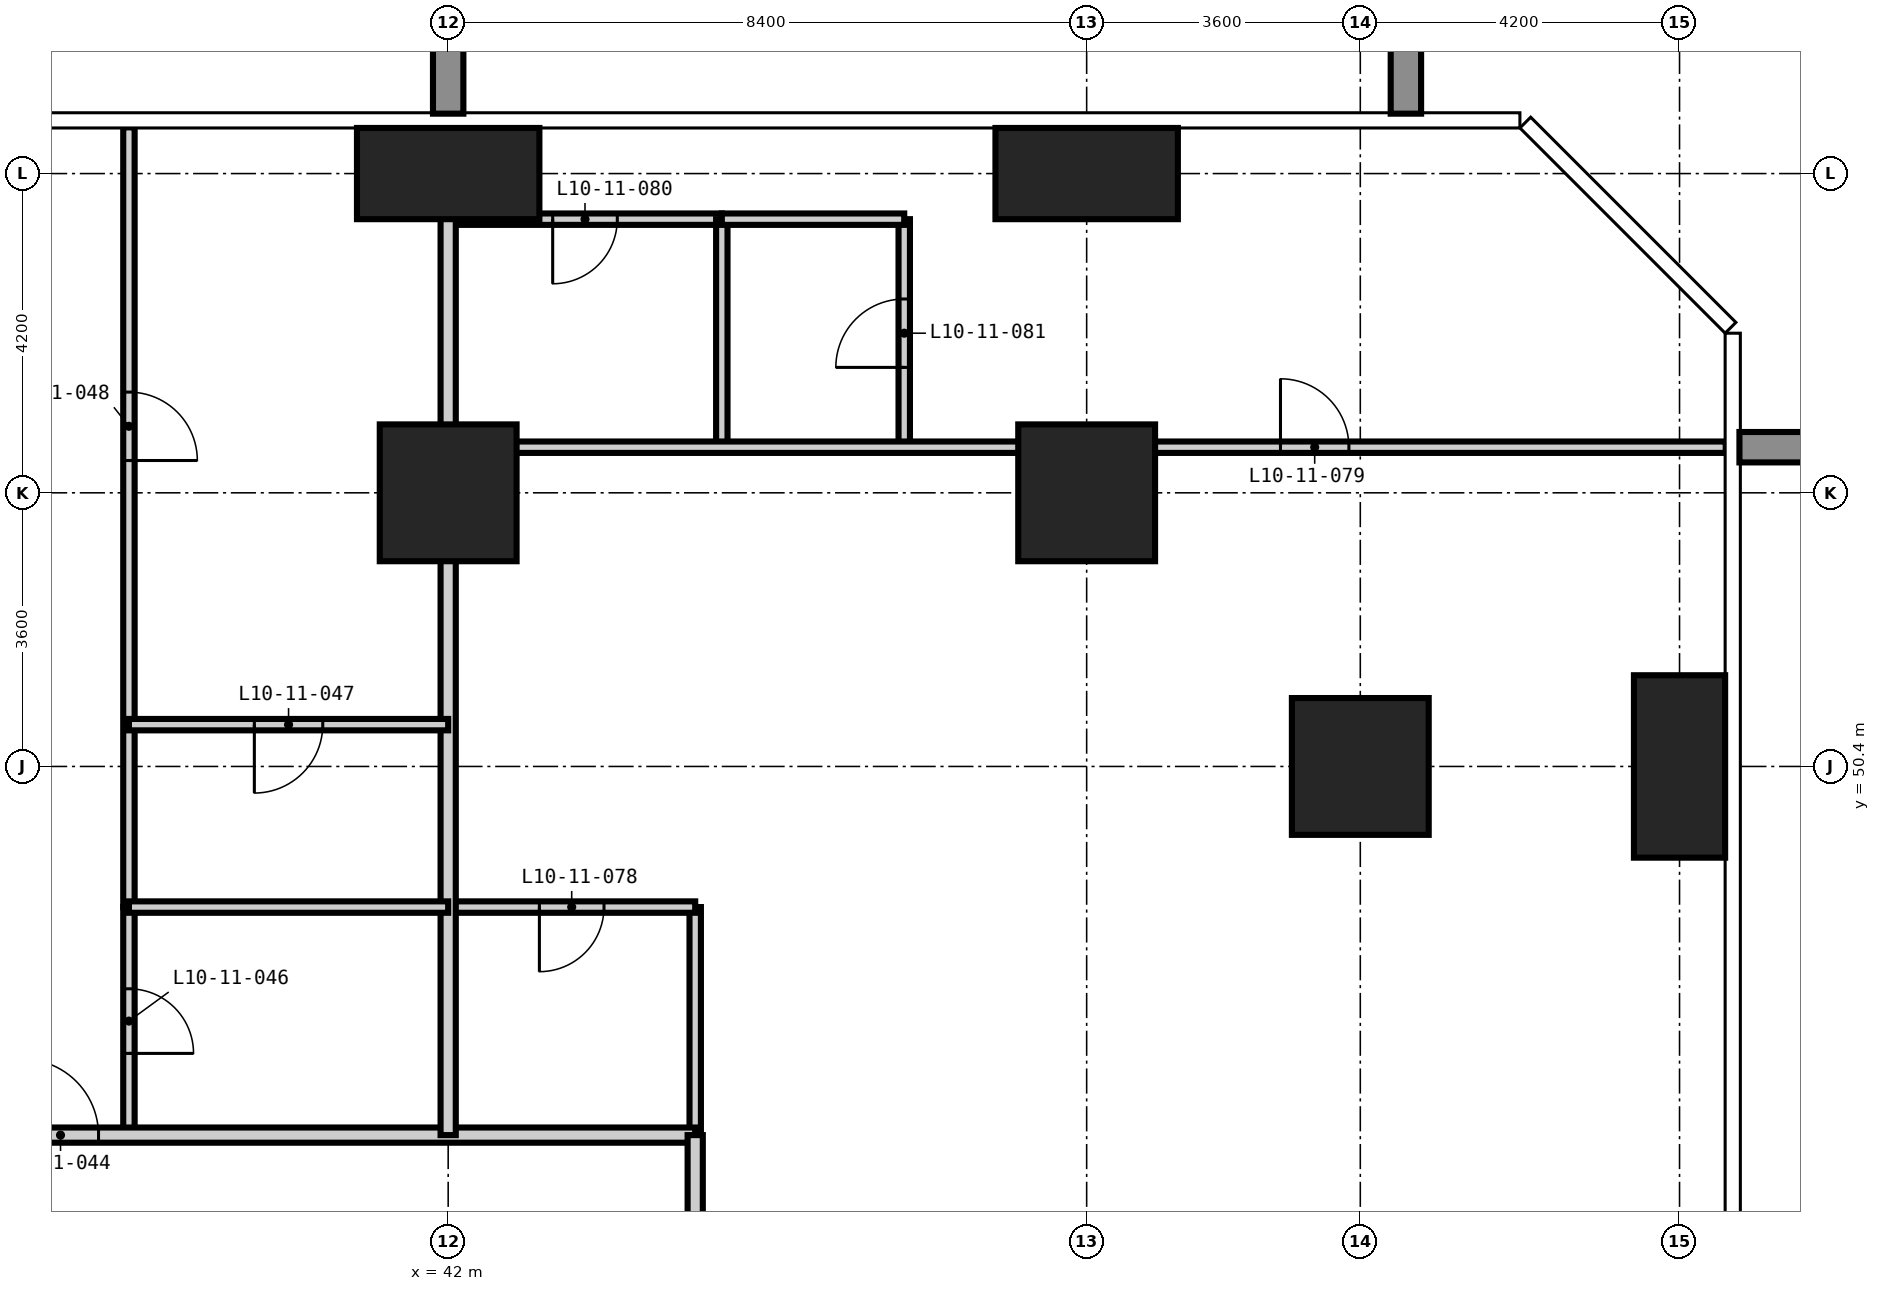
"""IFC4 building model, lengths in metres.
Left out: names, types, materials, properties, quantities, classifications, styles, units other than length and angle.
Written with IfcOpenShell. Run it as: python <this file> out.ifc"""

import sys

from ifc_helpers import new_model, si_unit, direction, frame, frame_2d, origin, origin_2d, place, context, subcontext, project, spatial, rectangle, extrude, element, fill, save


model = new_model("IFC4")
c1 = context("Model", 3, precision=1e-05, world=origin(), true_north=direction((0.0, 1.0)))
c2 = subcontext(c1, "Body", "Model", "MODEL_VIEW")
j1 = project(units=[si_unit("LENGTHUNIT", "METRE"), si_unit("PLANEANGLEUNIT", "RADIAN")], contexts=[c1])
p1 = place(None, origin())
s1 = spatial("IfcSite", under=j1, at=p1, CompositionType="ELEMENT")
p2 = place(p1, origin())
s2 = spatial("IfcBuilding", under=s1, at=p2, CompositionType="ELEMENT")
p3 = place(p2, frame((0.0, 0.0, 45.0)))
s3 = spatial("IfcBuildingStorey", under=s2, at=p3, CompositionType="ELEMENT", Elevation=45.0)
p4 = place(p3, frame((42.0, 54.0, -0.35), z_axis=(0.0, 0.0, 1.0), x_axis=(1.0, 0.0, 0.0)))
e1 = element("IfcColumn", 1, at=p4, inside=s3, PredefinedType="COLUMN", context=c2, shape_type="SweptSolid", body=[
    extrude(rectangle(XDim=1.8, YDim=1.8, at=origin_2d()), origin(), (0.0, 0.0, 1.0), 3.6),
])
p5 = place(p3, frame((42.0, 58.2, -0.35), z_axis=(0.0, 0.0, 1.0), x_axis=(1.0, 0.0, 0.0)))
e2 = element("IfcColumn", 2, at=p5, inside=s3, PredefinedType="COLUMN", context=c2, shape_type="SweptSolid", body=[
    extrude(rectangle(XDim=2.4, YDim=1.2, at=origin_2d()), origin(), (0.0, 0.0, 1.0), 3.6),
])
p6 = place(p3, frame((50.4, 54.0, -0.35), z_axis=(0.0, 0.0, 1.0), x_axis=(1.0, 0.0, 0.0)))
e3 = element("IfcColumn", 3, at=p6, inside=s3, PredefinedType="COLUMN", context=c2, shape_type="SweptSolid", body=[
    extrude(rectangle(XDim=1.8, YDim=1.8, at=origin_2d()), origin(), (0.0, 0.0, 1.0), 3.6),
])
p7 = place(p3, frame((50.4, 58.2, -0.35), z_axis=(0.0, 0.0, 1.0), x_axis=(1.0, 0.0, 0.0)))
e4 = element("IfcColumn", 4, at=p7, inside=s3, PredefinedType="COLUMN", context=c2, shape_type="SweptSolid", body=[
    extrude(rectangle(XDim=2.4, YDim=1.2, at=origin_2d()), origin(), (0.0, 0.0, 1.0), 3.6),
])
p8 = place(p3, frame((54.0, 50.4, -0.35), z_axis=(0.0, 0.0, 1.0), x_axis=(1.0, 0.0, 0.0)))
e5 = element("IfcColumn", 5, at=p8, inside=s3, PredefinedType="COLUMN", context=c2, shape_type="SweptSolid", body=[
    extrude(rectangle(XDim=1.8, YDim=1.8, at=origin_2d()), origin(), (0.0, 0.0, 1.0), 3.6),
])
p9 = place(p3, frame((58.2, 50.4, -0.35), z_axis=(0.0, 0.0, 1.0), x_axis=(1.0, 0.0, 0.0)))
e6 = element("IfcColumn", 6, at=p9, inside=s3, PredefinedType="COLUMN", context=c2, shape_type="SweptSolid", body=[
    extrude(rectangle(XDim=1.2, YDim=2.4, at=origin_2d()), origin(), (0.0, 0.0, 1.0), 3.6),
])
p10 = place(p3, frame((37.8, 45.55, 0.0), z_axis=(0.0, 0.0, 1.0), x_axis=(0.0, 1.0, 0.0)))
e7 = element("IfcWall", 7, at=p10, inside=s3, PredefinedType="PARTITIONING", context=c2, shape_type="SweptSolid", body=[
    extrude(rectangle(XDim=3.0, YDim=0.15, at=frame_2d((1.5, 0.0))), origin(), (0.0, 0.0, 1.0), 3.25),
])
p11 = place(p10, frame((1.075, 0.0, 0.0)))
e8 = element("IfcOpeningElement", 8, at=p11, cuts=e7, PredefinedType="OPENING", context=c2, shape_type="SweptSolid", body=[
    extrude(rectangle(XDim=0.85, YDim=2.1, at=frame_2d((0.425, 1.05))), frame((0.0, 0.085, 0.0), z_axis=(0.0, -1.0, 0.0), x_axis=(1.0, 0.0, 0.0)), (0.0, 0.0, 1.0), 0.17),
])
p12 = place(p3, frame((45.25, 45.55, 0.0), z_axis=(0.0, 0.0, 1.0), x_axis=(0.0, 1.0, 0.0)))
e9 = element("IfcWall", 9, at=p12, inside=s3, PredefinedType="PARTITIONING", context=c2, shape_type="SweptSolid", body=[
    extrude(rectangle(XDim=3.0, YDim=0.15, at=frame_2d((1.5, 0.0))), origin(), (0.0, 0.0, 1.0), 3.25),
])
p13 = place(p3, frame((42.0, 48.55, 0.0), z_axis=(0.0, 0.0, 1.0), x_axis=(1.0, 0.0, 0.0)))
e10 = element("IfcWall", 10, at=p13, inside=s3, PredefinedType="PARTITIONING", context=c2, shape_type="SweptSolid", body=[
    extrude(rectangle(XDim=3.25, YDim=0.15, at=frame_2d((1.625, 0.0))), origin(), (0.0, 0.0, 1.0), 3.25),
])
p14 = place(p13, frame((1.2, 0.0, 0.0)))
e11 = element("IfcOpeningElement", 11, at=p14, cuts=e10, PredefinedType="OPENING", context=c2, shape_type="SweptSolid", body=[
    extrude(rectangle(XDim=0.85, YDim=2.1, at=frame_2d((0.425, 1.05))), frame((0.0, 0.085, 0.0), z_axis=(0.0, -1.0, 0.0), x_axis=(1.0, 0.0, 0.0)), (0.0, 0.0, 1.0), 0.17),
])
p15 = place(p3, frame((42.0, 57.6, 0.0), z_axis=(0.0, 0.0, 1.0), x_axis=(1.0, 0.0, 0.0)))
e12 = element("IfcWall", 12, at=p15, inside=s3, PredefinedType="PARTITIONING", context=c2, shape_type="SweptSolid", body=[
    extrude(rectangle(XDim=3.6, YDim=0.15, at=frame_2d((1.8, 0.0))), origin(), (0.0, 0.0, 1.0), 3.25),
])
p16 = place(p15, frame((1.375, 0.0, 0.0)))
e13 = element("IfcOpeningElement", 13, at=p16, cuts=e12, PredefinedType="OPENING", context=c2, shape_type="SweptSolid", body=[
    extrude(rectangle(XDim=0.85, YDim=2.1, at=frame_2d((0.425, 1.05))), frame((0.0, 0.085, 0.0), z_axis=(0.0, -1.0, 0.0), x_axis=(1.0, 0.0, 0.0)), (0.0, 0.0, 1.0), 0.17),
])
p17 = place(p3, frame((12.95, 45.55, 0.0), z_axis=(0.0, 0.0, 1.0), x_axis=(1.0, 0.0, 0.0)))
e14 = element("IfcWall", 14, at=p17, inside=s3, PredefinedType="PARTITIONING", context=c2, shape_type="SweptSolid", body=[
    extrude(rectangle(XDim=32.3, YDim=0.2, at=frame_2d((16.15, 0.0))), origin(), (0.0, 0.0, 1.0), 3.25),
])
p18 = place(p17, frame((6.65, 0.0, 0.0)))
e15 = element("IfcOpeningElement", 15, at=p18, cuts=e14, PredefinedType="OPENING", context=c2, shape_type="SweptSolid", body=[
    extrude(rectangle(XDim=1.0, YDim=2.2, at=frame_2d((0.5, 1.1))), frame((0.0, 0.11, 0.0), z_axis=(0.0, -1.0, 0.0), x_axis=(1.0, 0.0, 0.0)), (0.0, 0.0, 1.0), 0.22),
])
p19 = place(p17, frame((15.05, 0.0, 0.0)))
e16 = element("IfcOpeningElement", 16, at=p19, cuts=e14, PredefinedType="OPENING", context=c2, shape_type="SweptSolid", body=[
    extrude(rectangle(XDim=1.0, YDim=2.2, at=frame_2d((0.5, 1.1))), frame((0.0, 0.11, 0.0), z_axis=(0.0, -1.0, 0.0), x_axis=(1.0, 0.0, 0.0)), (0.0, 0.0, 1.0), 0.22),
])
p20 = place(p17, frame((23.45, 0.0, 0.0)))
e17 = element("IfcOpeningElement", 17, at=p20, cuts=e14, PredefinedType="OPENING", context=c2, shape_type="SweptSolid", body=[
    extrude(rectangle(XDim=1.0, YDim=2.2, at=frame_2d((0.5, 1.1))), frame((0.0, 0.11, 0.0), z_axis=(0.0, -1.0, 0.0), x_axis=(1.0, 0.0, 0.0)), (0.0, 0.0, 1.0), 0.22),
])
p21 = place(p3, frame((45.25, 45.55, 0.0), z_axis=(0.0, 0.0, 1.0), x_axis=(0.0, -1.0, 0.0)))
e18 = element("IfcWall", 18, at=p21, inside=s3, PredefinedType="PARTITIONING", context=c2, shape_type="SweptSolid", body=[
    extrude(rectangle(XDim=32.6, YDim=0.2, at=frame_2d((16.3, 0.0))), origin(), (0.0, 0.0, 1.0), 3.25),
])
p22 = place(p21, frame((24.8, 0.0, 0.0)))
e19 = element("IfcOpeningElement", 19, at=p22, cuts=e18, PredefinedType="OPENING", context=c2, shape_type="SweptSolid", body=[
    extrude(rectangle(XDim=1.0, YDim=2.2, at=frame_2d((0.5, 1.1))), frame((0.0, 0.11, 0.0), z_axis=(0.0, -1.0, 0.0), x_axis=(1.0, 0.0, 0.0)), (0.0, 0.0, 1.0), 0.22),
])
p23 = place(p21, frame((19.85, 0.0, 0.0)))
e20 = element("IfcOpeningElement", 20, at=p23, cuts=e18, PredefinedType="OPENING", context=c2, shape_type="SweptSolid", body=[
    extrude(rectangle(XDim=1.0, YDim=2.2, at=frame_2d((0.5, 1.1))), frame((0.0, 0.11, 0.0), z_axis=(0.0, -1.0, 0.0), x_axis=(1.0, 0.0, 0.0)), (0.0, 0.0, 1.0), 0.22),
])
p24 = place(p21, frame((11.45, 0.0, 0.0)))
e21 = element("IfcOpeningElement", 21, at=p24, cuts=e18, PredefinedType="OPENING", context=c2, shape_type="SweptSolid", body=[
    extrude(rectangle(XDim=1.0, YDim=2.2, at=frame_2d((0.5, 1.1))), frame((0.0, 0.11, 0.0), z_axis=(0.0, -1.0, 0.0), x_axis=(1.0, 0.0, 0.0)), (0.0, 0.0, 1.0), 0.22),
])
p25 = place(p21, frame((6.5, 0.0, 0.0)))
e22 = element("IfcOpeningElement", 22, at=p25, cuts=e18, PredefinedType="OPENING", context=c2, shape_type="SweptSolid", body=[
    extrude(rectangle(XDim=1.0, YDim=2.2, at=frame_2d((0.5, 1.1))), frame((0.0, 0.11, 0.0), z_axis=(0.0, -1.0, 0.0), x_axis=(1.0, 0.0, 0.0)), (0.0, 0.0, 1.0), 0.22),
])
p26 = place(p21, frame((30.175, 0.0, 0.0)))
e23 = element("IfcOpeningElement", 23, at=p26, cuts=e18, PredefinedType="OPENING", context=c2, shape_type="SweptSolid", body=[
    extrude(rectangle(XDim=1.0, YDim=2.2, at=frame_2d((0.5, 1.1))), frame((0.0, 0.11, 0.0), z_axis=(0.0, -1.0, 0.0), x_axis=(1.0, 0.0, 0.0)), (0.0, 0.0, 1.0), 0.22),
])
p27 = place(p21, frame((1.275, 0.0, 0.0)))
e24 = element("IfcOpeningElement", 24, at=p27, cuts=e18, PredefinedType="OPENING", context=c2, shape_type="SweptSolid", body=[
    extrude(rectangle(XDim=1.0, YDim=2.2, at=frame_2d((0.5, 1.1))), frame((0.0, 0.11, 0.0), z_axis=(0.0, -1.0, 0.0), x_axis=(1.0, 0.0, 0.0)), (0.0, 0.0, 1.0), 0.22),
])
p28 = place(p3, frame((42.0, 45.55, 0.0), z_axis=(0.0, 0.0, 1.0), x_axis=(0.0, 1.0, 0.0)))
e25 = element("IfcWall", 25, at=p28, inside=s3, PredefinedType="PARTITIONING", context=c2, shape_type="SweptSolid", body=[
    extrude(rectangle(XDim=13.258, YDim=0.2, at=frame_2d((6.629, 0.0))), origin(), (0.0, 0.0, 1.0), 3.25),
])
p29 = place(p3, frame((37.8, 48.55, 0.0), z_axis=(0.0, 0.0, 1.0), x_axis=(0.0, 1.0, 0.0)))
e26 = element("IfcWall", 26, at=p29, inside=s3, PredefinedType="PARTITIONING", context=c2, shape_type="SweptSolid", body=[
    extrude(rectangle(XDim=10.258, YDim=0.15, at=frame_2d((5.129, 0.0))), origin(), (0.0, 0.0, 1.0), 3.25),
])
p30 = place(p29, frame((5.875, 0.0, 0.0)))
e27 = element("IfcOpeningElement", 27, at=p30, cuts=e26, PredefinedType="OPENING", context=c2, shape_type="SweptSolid", body=[
    extrude(rectangle(XDim=0.9, YDim=2.1, at=frame_2d((0.45, 1.05))), frame((0.0, 0.085, 0.0), z_axis=(0.0, -1.0, 0.0), x_axis=(1.0, 0.0, 0.0)), (0.0, 0.0, 1.0), 0.17),
])
p31 = place(p3, frame((45.6, 54.6, 0.0), z_axis=(0.0, 0.0, 1.0), x_axis=(0.0, 1.0, 0.0)))
e28 = element("IfcWall", 28, at=p31, inside=s3, PredefinedType="PARTITIONING", context=c2, shape_type="SweptSolid", body=[
    extrude(rectangle(XDim=3.0, YDim=0.15, at=frame_2d((1.5, 0.0))), origin(), (0.0, 0.0, 1.0), 3.25),
])
p32 = place(p3, frame((48.0, 54.6, 0.0), z_axis=(0.0, 0.0, 1.0), x_axis=(0.0, 1.0, 0.0)))
e29 = element("IfcWall", 29, at=p32, inside=s3, PredefinedType="PARTITIONING", context=c2, shape_type="SweptSolid", body=[
    extrude(rectangle(XDim=3.0, YDim=0.15, at=frame_2d((1.5, 0.0))), origin(), (0.0, 0.0, 1.0), 3.25),
])
p33 = place(p32, frame((1.05, 0.0, 0.0)))
e30 = element("IfcOpeningElement", 30, at=p33, cuts=e29, PredefinedType="OPENING", context=c2, shape_type="SweptSolid", body=[
    extrude(rectangle(XDim=0.9, YDim=2.1, at=frame_2d((0.45, 1.05))), frame((0.0, 0.085, 0.0), z_axis=(0.0, -1.0, 0.0), x_axis=(1.0, 0.0, 0.0)), (0.0, 0.0, 1.0), 0.17),
])
p34 = place(p3, frame((37.8, 48.55, 0.0), z_axis=(0.0, 0.0, 1.0), x_axis=(1.0, 0.0, 0.0)))
e31 = element("IfcWall", 31, at=p34, inside=s3, PredefinedType="PARTITIONING", context=c2, shape_type="SweptSolid", body=[
    extrude(rectangle(XDim=4.2, YDim=0.15, at=frame_2d((2.1, 0.0))), origin(), (0.0, 0.0, 1.0), 3.25),
])
p35 = place(p3, frame((37.8, 50.95, 0.0), z_axis=(0.0, 0.0, 1.0), x_axis=(1.0, 0.0, 0.0)))
e32 = element("IfcWall", 32, at=p35, inside=s3, PredefinedType="PARTITIONING", context=c2, shape_type="SweptSolid", body=[
    extrude(rectangle(XDim=4.2, YDim=0.15, at=frame_2d((2.1, 0.0))), origin(), (0.0, 0.0, 1.0), 3.25),
])
p36 = place(p35, frame((1.65, 0.0, 0.0)))
e33 = element("IfcOpeningElement", 33, at=p36, cuts=e32, PredefinedType="OPENING", context=c2, shape_type="SweptSolid", body=[
    extrude(rectangle(XDim=0.9, YDim=2.1, at=frame_2d((0.45, 1.05))), frame((0.0, 0.085, 0.0), z_axis=(0.0, -1.0, 0.0), x_axis=(1.0, 0.0, 0.0)), (0.0, 0.0, 1.0), 0.17),
])
p37 = place(p3, frame((42.0, 54.6, 0.0), z_axis=(0.0, 0.0, 1.0), x_axis=(1.0, 0.0, 0.0)))
e34 = element("IfcWall", 34, at=p37, inside=s3, PredefinedType="PARTITIONING", context=c2, shape_type="SweptSolid", body=[
    extrude(rectangle(XDim=16.808, YDim=0.15, at=frame_2d((8.404, 0.0))), origin(), (0.0, 0.0, 1.0), 3.25),
])
p38 = place(p37, frame((10.95, 0.0, 0.0)))
e35 = element("IfcOpeningElement", 35, at=p38, cuts=e34, PredefinedType="OPENING", context=c2, shape_type="SweptSolid", body=[
    extrude(rectangle(XDim=0.9, YDim=2.1, at=frame_2d((0.45, 1.05))), frame((0.0, 0.085, 0.0), z_axis=(0.0, -1.0, 0.0), x_axis=(1.0, 0.0, 0.0)), (0.0, 0.0, 1.0), 0.17),
])
p39 = place(p3, frame((45.6, 57.6, 0.0), z_axis=(0.0, 0.0, 1.0), x_axis=(1.0, 0.0, 0.0)))
e36 = element("IfcWall", 36, at=p39, inside=s3, PredefinedType="PARTITIONING", context=c2, shape_type="SweptSolid", body=[
    extrude(rectangle(XDim=2.4, YDim=0.15, at=frame_2d((1.2, 0.0))), origin(), (0.0, 0.0, 1.0), 3.25),
])
p40 = place(p20, origin())
e37 = element("IfcDoor", 37, at=p40, inside=s3, OperationType="SINGLE_SWING_LEFT", PredefinedType="DOOR", context=c2, shape_type="SweptSolid", body=[
    extrude(rectangle(XDim=1.0, YDim=2.2, at=frame_2d((0.5, 1.1))), frame((0.0, 0.025, 0.0), z_axis=(0.0, -1.0, 0.0), x_axis=(1.0, 0.0, 0.0)), (0.0, 0.0, 1.0), 0.05),
])
fill(e17, e37)
p41 = place(p11, frame((0.85, 0.0, 0.0), z_axis=(0.0, 0.0, 1.0), x_axis=(-1.0, 0.0, 0.0)))
e38 = element("IfcDoor", 38, at=p41, inside=s3, OperationType="SINGLE_SWING_RIGHT", PredefinedType="DOOR", context=c2, shape_type="SweptSolid", body=[
    extrude(rectangle(XDim=0.85, YDim=2.1, at=frame_2d((0.425, 1.05))), frame((0.0, 0.025, 0.0), z_axis=(0.0, -1.0, 0.0), x_axis=(1.0, 0.0, 0.0)), (0.0, 0.0, 1.0), 0.05),
])
fill(e8, e38)
p42 = place(p36, frame((0.9, 0.0, 0.0), z_axis=(0.0, 0.0, 1.0), x_axis=(-1.0, 0.0, 0.0)))
e39 = element("IfcDoor", 39, at=p42, inside=s3, OperationType="SINGLE_SWING_RIGHT", PredefinedType="DOOR", context=c2, shape_type="SweptSolid", body=[
    extrude(rectangle(XDim=0.9, YDim=2.1, at=frame_2d((0.45, 1.05))), frame((0.0, 0.025, 0.0), z_axis=(0.0, -1.0, 0.0), x_axis=(1.0, 0.0, 0.0)), (0.0, 0.0, 1.0), 0.05),
])
fill(e33, e39)
p43 = place(p30, frame((0.9, 0.0, 0.0), z_axis=(0.0, 0.0, 1.0), x_axis=(-1.0, 0.0, 0.0)))
e40 = element("IfcDoor", 40, at=p43, inside=s3, OperationType="SINGLE_SWING_RIGHT", PredefinedType="DOOR", context=c2, shape_type="SweptSolid", body=[
    extrude(rectangle(XDim=0.9, YDim=2.1, at=frame_2d((0.45, 1.05))), frame((0.0, 0.025, 0.0), z_axis=(0.0, -1.0, 0.0), x_axis=(1.0, 0.0, 0.0)), (0.0, 0.0, 1.0), 0.05),
])
fill(e27, e40)
p44 = place(p14, frame((0.85, 0.0, 0.0), z_axis=(0.0, 0.0, 1.0), x_axis=(-1.0, 0.0, 0.0)))
e41 = element("IfcDoor", 41, at=p44, inside=s3, OperationType="SINGLE_SWING_RIGHT", PredefinedType="DOOR", context=c2, shape_type="SweptSolid", body=[
    extrude(rectangle(XDim=0.85, YDim=2.1, at=frame_2d((0.425, 1.05))), frame((0.0, 0.025, 0.0), z_axis=(0.0, -1.0, 0.0), x_axis=(1.0, 0.0, 0.0)), (0.0, 0.0, 1.0), 0.05),
])
fill(e11, e41)
p45 = place(p38, origin())
e42 = element("IfcDoor", 42, at=p45, inside=s3, OperationType="SINGLE_SWING_LEFT", PredefinedType="DOOR", context=c2, shape_type="SweptSolid", body=[
    extrude(rectangle(XDim=0.9, YDim=2.1, at=frame_2d((0.45, 1.05))), frame((0.0, 0.025, 0.0), z_axis=(0.0, -1.0, 0.0), x_axis=(1.0, 0.0, 0.0)), (0.0, 0.0, 1.0), 0.05),
])
fill(e35, e42)
p46 = place(p16, frame((0.85, 0.0, 0.0), z_axis=(0.0, 0.0, 1.0), x_axis=(-1.0, 0.0, 0.0)))
e43 = element("IfcDoor", 43, at=p46, inside=s3, OperationType="SINGLE_SWING_RIGHT", PredefinedType="DOOR", context=c2, shape_type="SweptSolid", body=[
    extrude(rectangle(XDim=0.85, YDim=2.1, at=frame_2d((0.425, 1.05))), frame((0.0, 0.025, 0.0), z_axis=(0.0, -1.0, 0.0), x_axis=(1.0, 0.0, 0.0)), (0.0, 0.0, 1.0), 0.05),
])
fill(e13, e43)
p47 = place(p33, origin())
e44 = element("IfcDoor", 44, at=p47, inside=s3, OperationType="SINGLE_SWING_LEFT", PredefinedType="DOOR", context=c2, shape_type="SweptSolid", body=[
    extrude(rectangle(XDim=0.9, YDim=2.1, at=frame_2d((0.45, 1.05))), frame((0.0, 0.025, 0.0), z_axis=(0.0, -1.0, 0.0), x_axis=(1.0, 0.0, 0.0)), (0.0, 0.0, 1.0), 0.05),
])
fill(e30, e44)
save(model, sys.argv[1])
